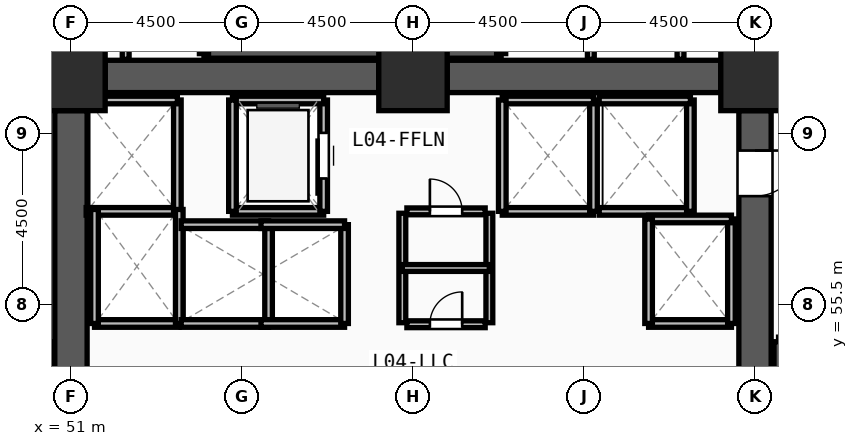
"""IFC4 building model, lengths in metres.
Left out: names, types, materials, properties, quantities, classifications, styles, units other than length and angle.
Written with IfcOpenShell. Run it as: python <this file> out.ifc"""

import sys

from ifc_helpers import new_model, si_unit, direction, frame, frame_2d, origin, origin_2d, place, context, subcontext, project, spatial, rectangle, extrude, source, transform, mapped, element, fill, save


model = new_model("IFC4")
c1 = context("Model", 3, precision=1e-05, world=origin(), true_north=direction((0.0, 1.0)))
c2 = subcontext(c1, "Body", "Model", "MODEL_VIEW")
j1 = project(units=[si_unit("LENGTHUNIT", "METRE"), si_unit("PLANEANGLEUNIT", "RADIAN")], contexts=[c1])
p1 = place(None, origin())
s1 = spatial("IfcSite", under=j1, at=p1, CompositionType="ELEMENT")
p2 = place(p1, origin())
s2 = spatial("IfcBuilding", under=s1, at=p2, CompositionType="ELEMENT")
p3 = place(p2, frame((0.0, 0.0, 14.4)))
s3 = spatial("IfcBuildingStorey", under=s2, at=p3, CompositionType="ELEMENT", Elevation=14.4)
m1 = source(origin(), c2, "Body", "SweptSolid", [
    extrude(rectangle(XDim=1.8, YDim=1.8, at=origin_2d()), origin(), (0.0, 0.0, 1.0), 4.5),
])
for number, where, z_axis, x_axis in (
    (1, (69.0, 61.5, 0.0), (0.0, 0.0, 1.0), (1.0, 0.0, 0.0)),
    (2, (60.0, 61.5, 0.0), (0.0, 0.0, 1.0), (1.0, 0.0, 0.0)),
    (3, (51.0, 61.5, 0.0), (0.0, 0.0, 1.0), (1.0, 0.0, 0.0)),
):
    element("IfcColumn", number, at=place(p3, frame(where, z_axis=z_axis, x_axis=x_axis)), inside=s3, PredefinedType="COLUMN", context=c2, shape_type="MappedRepresentation", body=[
        mapped(m1, transform((0.0, 0.0, 0.0), x_axis=(1.0, 0.0, 0.0), y_axis=(0.0, 1.0, 0.0), z_axis=(0.0, 0.0, 1.0), scale=1.0)),
    ])
for number, where, z_axis, x_axis in (
    (4, (51.9, 61.5, 0.0), (0.0, 0.0, 1.0), (1.0, 0.0, 0.0)),
    (5, (60.9, 61.5, 0.0), (0.0, 0.0, 1.0), (1.0, 0.0, 0.0)),
):
    element("IfcWall", number, at=place(p3, frame(where, z_axis=z_axis, x_axis=x_axis)), inside=s3, PredefinedType="SHEAR", context=c2, shape_type="SweptSolid", body=[
        extrude(rectangle(XDim=7.2, YDim=0.85, at=frame_2d((3.6, 0.0))), origin(), (0.0, 0.0, 1.0), 4.25),
    ])
p4 = place(p3, frame((69.0, 60.6, 0.0), z_axis=(0.0, 0.0, 1.0), x_axis=(0.0, -1.0, 0.0)))
e6 = element("IfcWall", 6, at=p4, inside=s3, PredefinedType="SHEAR", context=c2, shape_type="SweptSolid", body=[
    extrude(rectangle(XDim=13.2, YDim=0.85, at=frame_2d((6.6, 0.0))), origin(), (0.0, 0.0, 1.0), 4.25),
])
m2 = source(origin(), c2, "Body", "SweptSolid", [
    extrude(rectangle(XDim=1.2, YDim=2.2, at=frame_2d((0.6, 1.1))), frame((0.0, 0.435, 0.0), z_axis=(0.0, -1.0, 0.0), x_axis=(1.0, 0.0, 0.0)), (0.0, 0.0, 1.0), 0.87),
])
p5 = place(p4, frame((1.05, 0.0, 0.0)))
e7 = element("IfcOpeningElement", 7, at=p5, cuts=e6, PredefinedType="OPENING", context=c2, shape_type="MappedRepresentation", body=[
    mapped(m2, transform((0.0, 0.0, 0.0), x_axis=(1.0, 0.0, 0.0), y_axis=(0.0, 1.0, 0.0), z_axis=(0.0, 0.0, 1.0), scale=1.0)),
])
p6 = place(p3, frame((51.0, 47.4, 0.0), z_axis=(0.0, 0.0, 1.0), x_axis=(0.0, 1.0, 0.0)))
e8 = element("IfcWall", 8, at=p6, inside=s3, PredefinedType="SHEAR", context=c2, shape_type="SweptSolid", body=[
    extrude(rectangle(XDim=13.2, YDim=0.85, at=frame_2d((6.6, 0.0))), origin(), (0.0, 0.0, 1.0), 4.25),
])
for number, where, z_axis, x_axis in (
    (9, (69.62, 54.52, 0.0), (0.0, 0.0, 1.0), (0.0, -1.0, 0.0)),
    (10, (54.5, 62.1, 0.0), (0.0, 0.0, 1.0), (1.0, 0.0, 0.0)),
):
    element("IfcWall", number, at=place(p3, frame(where, z_axis=z_axis, x_axis=x_axis)), inside=s3, PredefinedType="SOLIDWALL", context=c2, shape_type="SweptSolid", body=[
        extrude(rectangle(XDim=7.82, YDim=0.24, at=frame_2d((3.91, 0.0))), origin(), (0.0, 0.0, 1.0), 4.25),
    ])
for number, where, z_axis, x_axis in (
    (11, (62.32, 62.1, 0.0), (0.0, 0.0, 1.0), (0.0, 1.0, 0.0)),
    (12, (54.5, 65.54, 0.0), (0.0, 0.0, 1.0), (0.0, -1.0, 0.0)),
):
    element("IfcWall", number, at=place(p3, frame(where, z_axis=z_axis, x_axis=x_axis)), inside=s3, PredefinedType="SOLIDWALL", context=c2, shape_type="SweptSolid", body=[
        extrude(rectangle(XDim=3.44, YDim=0.24, at=frame_2d((1.72, 0.0))), origin(), (0.0, 0.0, 1.0), 4.25),
    ])
p7 = place(p3, frame((55.25, 57.95, 0.0), z_axis=(0.0, 0.0, 1.0), x_axis=(1.0, 0.0, 0.0)))
e13 = element("IfcWall", 13, at=p7, inside=s3, PredefinedType="SOLIDWALL", context=c2, shape_type="SweptSolid", body=[
    extrude(rectangle(XDim=2.4, YDim=0.2, at=frame_2d((1.2, 0.0))), origin(), (0.0, 0.0, 1.0), 4.25),
])
p8 = place(p3, frame((57.65, 57.95, 0.0), z_axis=(0.0, 0.0, 1.0), x_axis=(0.0, 1.0, 0.0)))
e14 = element("IfcWall", 14, at=p8, inside=s3, PredefinedType="SOLIDWALL", context=c2, shape_type="SweptSolid", body=[
    extrude(rectangle(XDim=2.93, YDim=0.2, at=frame_2d((1.465, 0.0))), origin(), (0.0, 0.0, 1.0), 4.25),
])
m3 = source(origin(), c2, "Body", "SweptSolid", [
    extrude(rectangle(XDim=1.2, YDim=2.3, at=frame_2d((0.6, 1.15))), frame((0.0, 0.11, 0.0), z_axis=(0.0, -1.0, 0.0), x_axis=(1.0, 0.0, 0.0)), (0.0, 0.0, 1.0), 0.22),
])
p9 = place(p8, frame((0.865, 0.0, 0.0)))
e15 = element("IfcOpeningElement", 15, at=p9, cuts=e14, PredefinedType="OPENING", context=c2, shape_type="MappedRepresentation", body=[
    mapped(m3, transform((0.0, 0.0, 0.0), x_axis=(1.0, 0.0, 0.0), y_axis=(0.0, 1.0, 0.0), z_axis=(0.0, 0.0, 1.0), scale=1.0)),
])
p10 = place(p3, frame((57.65, 60.88, 0.0), z_axis=(0.0, 0.0, 1.0), x_axis=(-1.0, 0.0, 0.0)))
e16 = element("IfcWall", 16, at=p10, inside=s3, PredefinedType="SOLIDWALL", context=c2, shape_type="SweptSolid", body=[
    extrude(rectangle(XDim=2.4, YDim=0.2, at=frame_2d((1.2, 0.0))), origin(), (0.0, 0.0, 1.0), 4.25),
])
p11 = place(p3, frame((55.25, 60.88, 0.0), z_axis=(0.0, 0.0, 1.0), x_axis=(0.0, -1.0, 0.0)))
e17 = element("IfcWall", 17, at=p11, inside=s3, PredefinedType="SOLIDWALL", context=c2, shape_type="SweptSolid", body=[
    extrude(rectangle(XDim=2.93, YDim=0.2, at=frame_2d((1.465, 0.0))), origin(), (0.0, 0.0, 1.0), 4.25),
])
p12 = place(p3, frame((62.35, 57.95, 0.0), z_axis=(0.0, 0.0, 1.0), x_axis=(1.0, 0.0, 0.0)))
e18 = element("IfcWall", 18, at=p12, inside=s3, PredefinedType="SOLIDWALL", context=c2, shape_type="SweptSolid", body=[
    extrude(rectangle(XDim=2.4, YDim=0.2, at=frame_2d((1.2, 0.0))), origin(), (0.0, 0.0, 1.0), 4.25),
])
p13 = place(p3, frame((64.75, 57.95, 0.0), z_axis=(0.0, 0.0, 1.0), x_axis=(0.0, 1.0, 0.0)))
e19 = element("IfcWall", 19, at=p13, inside=s3, PredefinedType="SOLIDWALL", context=c2, shape_type="SweptSolid", body=[
    extrude(rectangle(XDim=2.93, YDim=0.2, at=frame_2d((1.465, 0.0))), origin(), (0.0, 0.0, 1.0), 4.25),
])
p14 = place(p3, frame((64.75, 60.88, 0.0), z_axis=(0.0, 0.0, 1.0), x_axis=(-1.0, 0.0, 0.0)))
e20 = element("IfcWall", 20, at=p14, inside=s3, PredefinedType="SOLIDWALL", context=c2, shape_type="SweptSolid", body=[
    extrude(rectangle(XDim=2.4, YDim=0.2, at=frame_2d((1.2, 0.0))), origin(), (0.0, 0.0, 1.0), 4.25),
])
p15 = place(p3, frame((62.35, 60.88, 0.0), z_axis=(0.0, 0.0, 1.0), x_axis=(0.0, -1.0, 0.0)))
e21 = element("IfcWall", 21, at=p15, inside=s3, PredefinedType="SOLIDWALL", context=c2, shape_type="SweptSolid", body=[
    extrude(rectangle(XDim=2.93, YDim=0.2, at=frame_2d((1.465, 0.0))), origin(), (0.0, 0.0, 1.0), 4.25),
])
p16 = place(p3, frame((64.9, 57.95, 0.0), z_axis=(0.0, 0.0, 1.0), x_axis=(1.0, 0.0, 0.0)))
e22 = element("IfcWall", 22, at=p16, inside=s3, PredefinedType="SOLIDWALL", context=c2, shape_type="SweptSolid", body=[
    extrude(rectangle(XDim=2.4, YDim=0.2, at=frame_2d((1.2, 0.0))), origin(), (0.0, 0.0, 1.0), 4.25),
])
p17 = place(p3, frame((67.3, 57.95, 0.0), z_axis=(0.0, 0.0, 1.0), x_axis=(0.0, 1.0, 0.0)))
e23 = element("IfcWall", 23, at=p17, inside=s3, PredefinedType="SOLIDWALL", context=c2, shape_type="SweptSolid", body=[
    extrude(rectangle(XDim=2.93, YDim=0.2, at=frame_2d((1.465, 0.0))), origin(), (0.0, 0.0, 1.0), 4.25),
])
for number, where, z_axis, x_axis in (
    (24, (67.3, 60.88, 0.0), (0.0, 0.0, 1.0), (-1.0, 0.0, 0.0)),
    (25, (51.4, 57.95, 0.0), (0.0, 0.0, 1.0), (1.0, 0.0, 0.0)),
):
    element("IfcWall", number, at=place(p3, frame(where, z_axis=z_axis, x_axis=x_axis)), inside=s3, PredefinedType="SOLIDWALL", context=c2, shape_type="SweptSolid", body=[
        extrude(rectangle(XDim=2.4, YDim=0.2, at=frame_2d((1.2, 0.0))), origin(), (0.0, 0.0, 1.0), 4.25),
    ])
p18 = place(p3, frame((53.8, 57.95, 0.0), z_axis=(0.0, 0.0, 1.0), x_axis=(0.0, 1.0, 0.0)))
e26 = element("IfcWall", 26, at=p18, inside=s3, PredefinedType="SOLIDWALL", context=c2, shape_type="SweptSolid", body=[
    extrude(rectangle(XDim=2.93, YDim=0.2, at=frame_2d((1.465, 0.0))), origin(), (0.0, 0.0, 1.0), 4.25),
])
p19 = place(p3, frame((53.8, 60.88, 0.0), z_axis=(0.0, 0.0, 1.0), x_axis=(-1.0, 0.0, 0.0)))
e27 = element("IfcWall", 27, at=p19, inside=s3, PredefinedType="SOLIDWALL", context=c2, shape_type="SweptSolid", body=[
    extrude(rectangle(XDim=2.4, YDim=0.2, at=frame_2d((1.2, 0.0))), origin(), (0.0, 0.0, 1.0), 4.25),
])
p20 = place(p3, frame((51.62, 55.0, 0.0), z_axis=(0.0, 0.0, 1.0), x_axis=(1.0, 0.0, 0.0)))
e28 = element("IfcWall", 28, at=p20, inside=s3, PredefinedType="SOLIDWALL", context=c2, shape_type="SweptSolid", body=[
    extrude(rectangle(XDim=2.23, YDim=0.2, at=frame_2d((1.115, 0.0))), origin(), (0.0, 0.0, 1.0), 4.25),
])
for number, where, z_axis, x_axis in (
    (29, (53.85, 55.0, 0.0), (0.0, 0.0, 1.0), (0.0, 1.0, 0.0)),
    (30, (51.62, 58.0, 0.0), (0.0, 0.0, 1.0), (0.0, -1.0, 0.0)),
):
    element("IfcWall", number, at=place(p3, frame(where, z_axis=z_axis, x_axis=x_axis)), inside=s3, PredefinedType="SOLIDWALL", context=c2, shape_type="SweptSolid", body=[
        extrude(rectangle(XDim=3.0, YDim=0.2, at=frame_2d((1.5, 0.0))), origin(), (0.0, 0.0, 1.0), 4.25),
    ])
p21 = place(p3, frame((66.2, 55.0, 0.0), z_axis=(0.0, 0.0, 1.0), x_axis=(1.0, 0.0, 0.0)))
e31 = element("IfcWall", 31, at=p21, inside=s3, PredefinedType="SOLIDWALL", context=c2, shape_type="SweptSolid", body=[
    extrude(rectangle(XDim=2.18, YDim=0.2, at=frame_2d((1.09, 0.0))), origin(), (0.0, 0.0, 1.0), 4.25),
])
p22 = place(p3, frame((68.38, 55.0, 0.0), z_axis=(0.0, 0.0, 1.0), x_axis=(0.0, 1.0, 0.0)))
e32 = element("IfcWall", 32, at=p22, inside=s3, PredefinedType="SOLIDWALL", context=c2, shape_type="SweptSolid", body=[
    extrude(rectangle(XDim=2.75, YDim=0.2, at=frame_2d((1.375, 0.0))), origin(), (0.0, 0.0, 1.0), 4.25),
])
p23 = place(p3, frame((68.38, 57.75, 0.0), z_axis=(0.0, 0.0, 1.0), x_axis=(-1.0, 0.0, 0.0)))
e33 = element("IfcWall", 33, at=p23, inside=s3, PredefinedType="SOLIDWALL", context=c2, shape_type="SweptSolid", body=[
    extrude(rectangle(XDim=2.18, YDim=0.2, at=frame_2d((1.09, 0.0))), origin(), (0.0, 0.0, 1.0), 4.25),
])
p24 = place(p3, frame((66.2, 57.75, 0.0), z_axis=(0.0, 0.0, 1.0), x_axis=(0.0, -1.0, 0.0)))
e34 = element("IfcWall", 34, at=p24, inside=s3, PredefinedType="SOLIDWALL", context=c2, shape_type="SweptSolid", body=[
    extrude(rectangle(XDim=2.75, YDim=0.2, at=frame_2d((1.375, 0.0))), origin(), (0.0, 0.0, 1.0), 4.25),
])
p25 = place(p3, frame((53.9, 55.0, 0.0), z_axis=(0.0, 0.0, 1.0), x_axis=(1.0, 0.0, 0.0)))
e35 = element("IfcWall", 35, at=p25, inside=s3, PredefinedType="SOLIDWALL", context=c2, shape_type="SweptSolid", body=[
    extrude(rectangle(XDim=2.3, YDim=0.2, at=frame_2d((1.15, 0.0))), origin(), (0.0, 0.0, 1.0), 4.25),
])
p26 = place(p3, frame((56.2, 55.0, 0.0), z_axis=(0.0, 0.0, 1.0), x_axis=(0.0, 1.0, 0.0)))
e36 = element("IfcWall", 36, at=p26, inside=s3, PredefinedType="SOLIDWALL", context=c2, shape_type="SweptSolid", body=[
    extrude(rectangle(XDim=2.6, YDim=0.2, at=frame_2d((1.3, 0.0))), origin(), (0.0, 0.0, 1.0), 4.25),
])
p27 = place(p3, frame((56.2, 57.6, 0.0), z_axis=(0.0, 0.0, 1.0), x_axis=(-1.0, 0.0, 0.0)))
e37 = element("IfcWall", 37, at=p27, inside=s3, PredefinedType="SOLIDWALL", context=c2, shape_type="SweptSolid", body=[
    extrude(rectangle(XDim=2.3, YDim=0.2, at=frame_2d((1.15, 0.0))), origin(), (0.0, 0.0, 1.0), 4.25),
])
p28 = place(p3, frame((56.0, 55.0, 0.0), z_axis=(0.0, 0.0, 1.0), x_axis=(1.0, 0.0, 0.0)))
e38 = element("IfcWall", 38, at=p28, inside=s3, PredefinedType="SOLIDWALL", context=c2, shape_type="SweptSolid", body=[
    extrude(rectangle(XDim=2.2, YDim=0.2, at=frame_2d((1.1, 0.0))), origin(), (0.0, 0.0, 1.0), 4.25),
])
p29 = place(p3, frame((58.2, 55.0, 0.0), z_axis=(0.0, 0.0, 1.0), x_axis=(0.0, 1.0, 0.0)))
e39 = element("IfcWall", 39, at=p29, inside=s3, PredefinedType="SOLIDWALL", context=c2, shape_type="SweptSolid", body=[
    extrude(rectangle(XDim=2.6, YDim=0.2, at=frame_2d((1.3, 0.0))), origin(), (0.0, 0.0, 1.0), 4.25),
])
p30 = place(p3, frame((58.2, 57.6, 0.0), z_axis=(0.0, 0.0, 1.0), x_axis=(-1.0, 0.0, 0.0)))
e40 = element("IfcWall", 40, at=p30, inside=s3, PredefinedType="SOLIDWALL", context=c2, shape_type="SweptSolid", body=[
    extrude(rectangle(XDim=2.2, YDim=0.2, at=frame_2d((1.1, 0.0))), origin(), (0.0, 0.0, 1.0), 4.25),
])
p31 = place(p3, frame((59.84, 54.98, 0.0), z_axis=(0.0, 0.0, 1.0), x_axis=(1.0, 0.0, 0.0)))
e41 = element("IfcWall", 41, at=p31, inside=s3, PredefinedType="PARTITIONING", context=c2, shape_type="SweptSolid", body=[
    extrude(rectangle(XDim=2.06, YDim=0.18, at=frame_2d((1.03, 0.0))), origin(), (0.0, 0.0, 1.0), 4.25),
])
m4 = source(origin(), c2, "Body", "SweptSolid", [
    extrude(rectangle(XDim=0.85, YDim=2.1, at=frame_2d((0.425, 1.05))), frame((0.0, 0.1, 0.0), z_axis=(0.0, -1.0, 0.0), x_axis=(1.0, 0.0, 0.0)), (0.0, 0.0, 1.0), 0.2),
])
p32 = place(p31, frame((0.605, 0.0, 0.0)))
e42 = element("IfcOpeningElement", 42, at=p32, cuts=e41, PredefinedType="OPENING", context=c2, shape_type="MappedRepresentation", body=[
    mapped(m4, transform((0.0, 0.0, 0.0), x_axis=(1.0, 0.0, 0.0), y_axis=(0.0, 1.0, 0.0), z_axis=(0.0, 0.0, 1.0), scale=1.0)),
])
p33 = place(p3, frame((59.84, 57.95, 0.0), z_axis=(0.0, 0.0, 1.0), x_axis=(1.0, 0.0, 0.0)))
e43 = element("IfcWall", 43, at=p33, inside=s3, PredefinedType="PARTITIONING", context=c2, shape_type="SweptSolid", body=[
    extrude(rectangle(XDim=2.06, YDim=0.18, at=frame_2d((1.03, 0.0))), origin(), (0.0, 0.0, 1.0), 4.25),
])
p34 = place(p33, frame((0.605, 0.0, 0.0)))
e44 = element("IfcOpeningElement", 44, at=p34, cuts=e43, PredefinedType="OPENING", context=c2, shape_type="MappedRepresentation", body=[
    mapped(m4, transform((0.0, 0.0, 0.0), x_axis=(1.0, 0.0, 0.0), y_axis=(0.0, 1.0, 0.0), z_axis=(0.0, 0.0, 1.0), scale=1.0)),
])
for number, where, z_axis, x_axis in (
    (45, (59.72, 55.02, 0.0), (0.0, 0.0, 1.0), (0.0, 1.0, 0.0)),
    (46, (62.01, 55.02, 0.0), (0.0, 0.0, 1.0), (0.0, 1.0, 0.0)),
):
    element("IfcWall", number, at=place(p3, frame(where, z_axis=z_axis, x_axis=x_axis)), inside=s3, PredefinedType="PARTITIONING", context=c2, shape_type="SweptSolid", body=[
        extrude(rectangle(XDim=2.88, YDim=0.18, at=frame_2d((1.44, 0.0))), origin(), (0.0, 0.0, 1.0), 4.25),
    ])
p35 = place(p3, frame((59.72, 56.46, 0.0), z_axis=(0.0, 0.0, 1.0), x_axis=(1.0, 0.0, 0.0)))
e47 = element("IfcWall", 47, at=p35, inside=s3, PredefinedType="PARTITIONING", context=c2, shape_type="SweptSolid", body=[
    extrude(rectangle(XDim=2.29, YDim=0.18, at=frame_2d((1.145, 0.0))), origin(), (0.0, 0.0, 1.0), 4.25),
])
for number, where, z_axis, x_axis in (
    (48, (50.54, 61.95, 0.0), (0.0, 0.0, 1.0), (0.0, 1.0, 0.0)),
    (49, (52.44, 61.95, 0.0), (0.0, 0.0, 1.0), (0.0, 1.0, 0.0)),
    (50, (64.68, 61.95, 0.0), (0.0, 0.0, 1.0), (0.0, 1.0, 0.0)),
    (51, (67.04, 61.95, 0.0), (0.0, 0.0, 1.0), (0.0, 1.0, 0.0)),
    (52, (69.46, 61.95, 0.0), (0.0, 0.0, 1.0), (0.0, 1.0, 0.0)),
):
    element("IfcWall", number, at=place(p3, frame(where, z_axis=z_axis, x_axis=x_axis)), inside=s3, PredefinedType="PARTITIONING", context=c2, shape_type="SweptSolid", body=[
        extrude(rectangle(XDim=3.77, YDim=0.18, at=frame_2d((1.885, 0.0))), origin(), (0.0, 0.0, 1.0), 4.25),
    ])
m5 = source(origin(), c2, "Body", "SweptSolid", [
    extrude(rectangle(XDim=1.2, YDim=2.2, at=frame_2d((0.6, 1.1))), frame((0.0, 0.025, 0.0), z_axis=(0.0, -1.0, 0.0), x_axis=(1.0, 0.0, 0.0)), (0.0, 0.0, 1.0), 0.05),
])
p36 = place(p5, origin())
e53 = element("IfcDoor", 53, at=p36, inside=s3, OperationType="SINGLE_SWING_LEFT", PredefinedType="DOOR", context=c2, shape_type="MappedRepresentation", body=[
    mapped(m5, transform((0.0, 0.0, 0.0), x_axis=(1.0, 0.0, 0.0), y_axis=(0.0, 1.0, 0.0), z_axis=(0.0, 0.0, 1.0), scale=1.0)),
])
fill(e7, e53)
m6 = source(origin(), c2, "Body", "SweptSolid", [
    extrude(rectangle(XDim=1.2, YDim=2.3, at=frame_2d((0.6, 1.15))), frame((0.0, 0.025, 0.0), z_axis=(0.0, -1.0, 0.0), x_axis=(1.0, 0.0, 0.0)), (0.0, 0.0, 1.0), 0.05),
])
p37 = place(p9, origin())
e54 = element("IfcDoor", 54, at=p37, inside=s3, OperationType="SLIDING_TO_LEFT", PredefinedType="DOOR", context=c2, shape_type="MappedRepresentation", body=[
    mapped(m6, transform((0.0, 0.0, 0.0), x_axis=(1.0, 0.0, 0.0), y_axis=(0.0, 1.0, 0.0), z_axis=(0.0, 0.0, 1.0), scale=1.0)),
])
fill(e15, e54)
m7 = source(origin(), c2, "Body", "SweptSolid", [
    extrude(rectangle(XDim=0.85, YDim=2.1, at=frame_2d((0.425, 1.05))), frame((0.0, 0.025, 0.0), z_axis=(0.0, -1.0, 0.0), x_axis=(1.0, 0.0, 0.0)), (0.0, 0.0, 1.0), 0.05),
])
p38 = place(p32, origin())
e55 = element("IfcDoor", 55, at=p38, inside=s3, OperationType="SINGLE_SWING_RIGHT", PredefinedType="DOOR", context=c2, shape_type="MappedRepresentation", body=[
    mapped(m7, transform((0.0, 0.0, 0.0), x_axis=(1.0, 0.0, 0.0), y_axis=(0.0, 1.0, 0.0), z_axis=(0.0, 0.0, 1.0), scale=1.0)),
])
fill(e42, e55)
p39 = place(p34, origin())
e56 = element("IfcDoor", 56, at=p39, inside=s3, OperationType="SINGLE_SWING_LEFT", PredefinedType="DOOR", context=c2, shape_type="MappedRepresentation", body=[
    mapped(m7, transform((0.0, 0.0, 0.0), x_axis=(1.0, 0.0, 0.0), y_axis=(0.0, 1.0, 0.0), z_axis=(0.0, 0.0, 1.0), scale=1.0)),
])
fill(e44, e56)
save(model, sys.argv[1])
